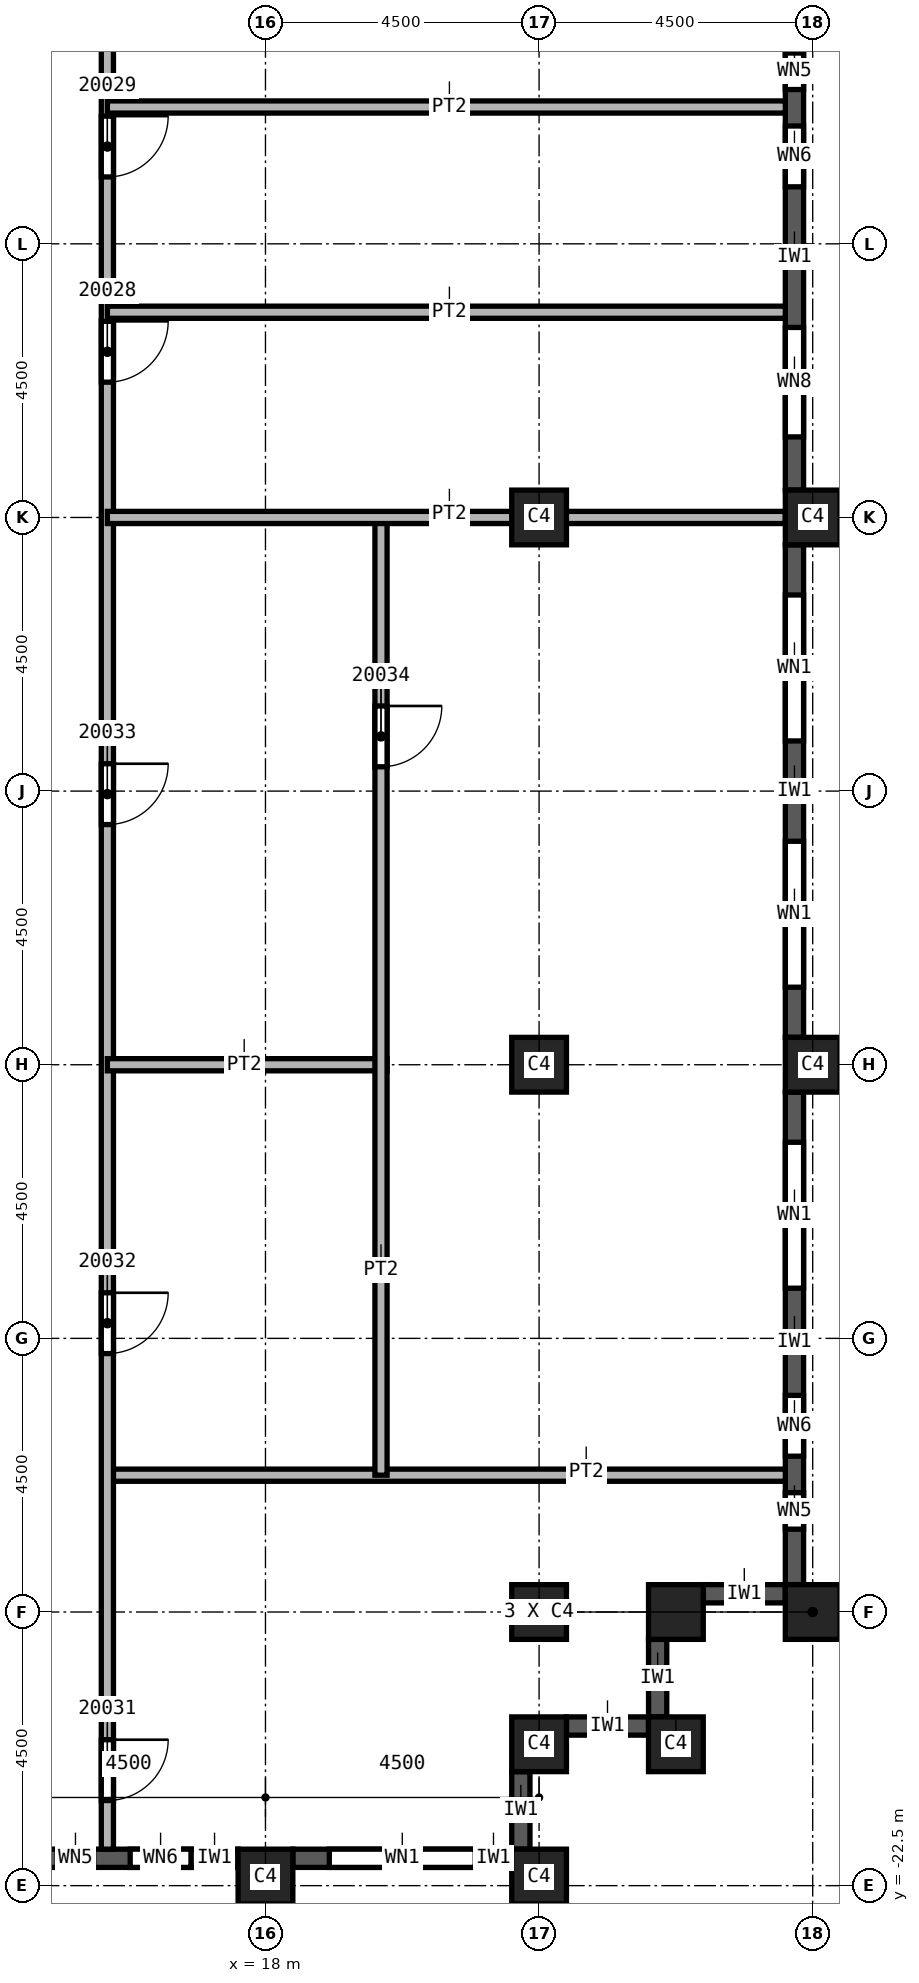
"""IFC4 building model, lengths in metres.
Left out: names, types, materials, properties, quantities, classifications, styles, units other than length and angle.
Written with IfcOpenShell. Run it as: python <this file> out.ifc"""

import sys

from ifc_helpers import new_model, si_unit, direction, frame, frame_2d, origin, origin_2d, place, context, subcontext, project, spatial, rectangle, extrude, element, fill, save


model = new_model("IFC4")
c1 = context("Model", 3, precision=1e-05, world=origin(), true_north=direction((0.0, 1.0)))
c2 = subcontext(c1, "Body", "Model", "MODEL_VIEW")
j1 = project(units=[si_unit("LENGTHUNIT", "METRE"), si_unit("PLANEANGLEUNIT", "RADIAN")], contexts=[c1])
p1 = place(None, origin())
s1 = spatial("IfcSite", under=j1, at=p1, CompositionType="ELEMENT")
p2 = place(p1, origin())
s2 = spatial("IfcBuilding", under=s1, at=p2, CompositionType="ELEMENT")
p3 = place(p2, frame((0.0, 0.0, 286.0)))
s3 = spatial("IfcBuildingStorey", under=s2, at=p3, CompositionType="ELEMENT", Elevation=286.0)
for number, where, z_axis, x_axis in (
    (1, (22.5, 0.0, 0.0), (0.0, 0.0, 1.0), (1.0, 0.0, 0.0)),
    (2, (22.5, -9.0, 0.0), (0.0, 0.0, 1.0), (1.0, 0.0, 0.0)),
    (3, (22.5, -18.0, 0.0), (0.0, 0.0, 1.0), (1.0, 0.0, 0.0)),
    (4, (27.0, 0.0, 0.0), (0.0, 0.0, 1.0), (0.0, 1.0, 0.0)),
    (5, (27.0, -9.0, 0.0), (0.0, 0.0, 1.0), (0.0, 1.0, 0.0)),
    (6, (27.0, -18.0, 0.0), (0.0, 0.0, 1.0), (0.0, 1.0, 0.0)),
    (7, (18.0, -22.35, 0.0), (0.0, 0.0, 1.0), (1.0, 0.0, 0.0)),
    (8, (22.5, -22.35, 0.0), (0.0, 0.0, 1.0), (1.0, 0.0, 0.0)),
    (9, (22.5, -20.175, 0.0), (0.0, 0.0, 1.0), (1.0, 0.0, 0.0)),
    (10, (24.75, -20.175, 0.0), (0.0, 0.0, 1.0), (1.0, 0.0, 0.0)),
    (11, (24.75, -18.0, 0.0), (0.0, 0.0, 1.0), (1.0, 0.0, 0.0)),
):
    element("IfcColumn", number, at=place(p3, frame(where, z_axis=z_axis, x_axis=x_axis)), inside=s3, PredefinedType="COLUMN", context=c2, shape_type="SweptSolid", body=[
        extrude(rectangle(XDim=0.9, YDim=0.9, at=origin_2d()), origin(), (0.0, 0.0, 1.0), 3.72),
    ])
p4 = place(p3, frame((13.95, -22.05, 0.0), z_axis=(0.0, 0.0, 1.0), x_axis=(1.0, 0.0, 0.0)))
e12 = element("IfcWall", 12, at=p4, inside=s3, PredefinedType="SOLIDWALL", context=c2, shape_type="SweptSolid", body=[
    extrude(rectangle(XDim=3.6, YDim=0.3, at=frame_2d((1.8, 0.0))), origin(), (0.0, 0.0, 1.0), 3.12),
])
p5 = place(p4, frame((0.625, 0.0, 0.8)))
e13 = element("IfcOpeningElement", 13, at=p5, cuts=e12, PredefinedType="OPENING", context=c2, shape_type="SweptSolid", body=[
    extrude(rectangle(XDim=0.6, YDim=1.95, at=frame_2d((0.3, 0.975))), frame((0.0, 0.15, 0.0), z_axis=(0.0, -1.0, 0.0), x_axis=(1.0, 0.0, 0.0)), (0.0, 0.0, 1.0), 0.3),
])
p6 = place(p4, frame((1.825, 0.0, 0.8)))
e14 = element("IfcOpeningElement", 14, at=p6, cuts=e12, PredefinedType="OPENING", context=c2, shape_type="SweptSolid", body=[
    extrude(rectangle(XDim=1.0, YDim=1.95, at=frame_2d((0.5, 0.975))), frame((0.0, 0.15, 0.0), z_axis=(0.0, -1.0, 0.0), x_axis=(1.0, 0.0, 0.0)), (0.0, 0.0, 1.0), 0.3),
])
p7 = place(p3, frame((18.45, -22.05, 0.0), z_axis=(0.0, 0.0, 1.0), x_axis=(1.0, 0.0, 0.0)))
e15 = element("IfcWall", 15, at=p7, inside=s3, PredefinedType="SOLIDWALL", context=c2, shape_type="SweptSolid", body=[
    extrude(rectangle(XDim=3.6, YDim=0.3, at=frame_2d((1.8, 0.0))), origin(), (0.0, 0.0, 1.0), 3.12),
])
p8 = place(p7, frame((0.6, 0.0, 0.8)))
e16 = element("IfcOpeningElement", 16, at=p8, cuts=e15, PredefinedType="OPENING", context=c2, shape_type="SweptSolid", body=[
    extrude(rectangle(XDim=2.4, YDim=1.95, at=frame_2d((1.2, 0.975))), frame((0.0, 0.15, 0.0), z_axis=(0.0, -1.0, 0.0), x_axis=(1.0, 0.0, 0.0)), (0.0, 0.0, 1.0), 0.3),
])
p9 = place(p3, frame((22.2, -21.9, 0.0), z_axis=(0.0, 0.0, 1.0), x_axis=(0.0, 1.0, 0.0)))
e17 = element("IfcWall", 17, at=p9, inside=s3, PredefinedType="SOLIDWALL", context=c2, shape_type="SweptSolid", body=[
    extrude(rectangle(XDim=1.275, YDim=0.3, at=frame_2d((0.637, 0.0))), origin(), (0.0, 0.0, 1.0), 3.12),
])
p10 = place(p3, frame((22.95, -19.875, 0.0), z_axis=(0.0, 0.0, 1.0), x_axis=(1.0, 0.0, 0.0)))
e18 = element("IfcWall", 18, at=p10, inside=s3, PredefinedType="SOLIDWALL", context=c2, shape_type="SweptSolid", body=[
    extrude(rectangle(XDim=1.35, YDim=0.3, at=frame_2d((0.675, 0.0))), origin(), (0.0, 0.0, 1.0), 3.12),
])
p11 = place(p3, frame((24.45, -19.725, 0.0), z_axis=(0.0, 0.0, 1.0), x_axis=(0.0, 1.0, 0.0)))
e19 = element("IfcWall", 19, at=p11, inside=s3, PredefinedType="SOLIDWALL", context=c2, shape_type="SweptSolid", body=[
    extrude(rectangle(XDim=1.275, YDim=0.3, at=frame_2d((0.638, 0.0))), origin(), (0.0, 0.0, 1.0), 3.12),
])
p12 = place(p3, frame((25.2, -17.7, 0.0), z_axis=(0.0, 0.0, 1.0), x_axis=(1.0, 0.0, 0.0)))
e20 = element("IfcWall", 20, at=p12, inside=s3, PredefinedType="SOLIDWALL", context=c2, shape_type="SweptSolid", body=[
    extrude(rectangle(XDim=1.35, YDim=0.3, at=frame_2d((0.675, 0.0))), origin(), (0.0, 0.0, 1.0), 3.12),
])
p13 = place(p3, frame((26.7, -17.55, 0.0), z_axis=(0.0, 0.0, 1.0), x_axis=(0.0, 1.0, 0.0)))
e21 = element("IfcWall", 21, at=p13, inside=s3, PredefinedType="SOLIDWALL", context=c2, shape_type="SweptSolid", body=[
    extrude(rectangle(XDim=8.1, YDim=0.3, at=frame_2d((4.05, 0.0))), origin(), (0.0, 0.0, 1.0), 3.12),
])
p14 = place(p13, frame((4.875, 0.0, 0.8)))
e22 = element("IfcOpeningElement", 22, at=p14, cuts=e21, PredefinedType="OPENING", context=c2, shape_type="SweptSolid", body=[
    extrude(rectangle(XDim=2.4, YDim=1.95, at=frame_2d((1.2, 0.975))), frame((0.0, 0.15, 0.0), z_axis=(0.0, -1.0, 0.0), x_axis=(1.0, 0.0, 0.0)), (0.0, 0.0, 1.0), 0.3),
])
p15 = place(p13, frame((0.913, 0.0, 0.8)))
e23 = element("IfcOpeningElement", 23, at=p15, cuts=e21, PredefinedType="OPENING", context=c2, shape_type="SweptSolid", body=[
    extrude(rectangle(XDim=0.6, YDim=1.95, at=frame_2d((0.3, 0.975))), frame((0.0, 0.15, 0.0), z_axis=(0.0, -1.0, 0.0), x_axis=(1.0, 0.0, 0.0)), (0.0, 0.0, 1.0), 0.3),
])
p16 = place(p13, frame((2.113, 0.0, 0.8)))
e24 = element("IfcOpeningElement", 24, at=p16, cuts=e21, PredefinedType="OPENING", context=c2, shape_type="SweptSolid", body=[
    extrude(rectangle(XDim=1.0, YDim=1.95, at=frame_2d((0.5, 0.975))), frame((0.0, 0.15, 0.0), z_axis=(0.0, -1.0, 0.0), x_axis=(1.0, 0.0, 0.0)), (0.0, 0.0, 1.0), 0.3),
])
p17 = place(p3, frame((26.7, -8.55, 0.0), z_axis=(0.0, 0.0, 1.0), x_axis=(0.0, 1.0, 0.0)))
e25 = element("IfcWall", 25, at=p17, inside=s3, PredefinedType="SOLIDWALL", context=c2, shape_type="SweptSolid", body=[
    extrude(rectangle(XDim=8.1, YDim=0.3, at=frame_2d((4.05, 0.0))), origin(), (0.0, 0.0, 1.0), 3.12),
])
p18 = place(p17, frame((0.825, 0.0, 0.8)))
e26 = element("IfcOpeningElement", 26, at=p18, cuts=e25, PredefinedType="OPENING", context=c2, shape_type="SweptSolid", body=[
    extrude(rectangle(XDim=2.4, YDim=1.95, at=frame_2d((1.2, 0.975))), frame((0.0, 0.15, 0.0), z_axis=(0.0, -1.0, 0.0), x_axis=(1.0, 0.0, 0.0)), (0.0, 0.0, 1.0), 0.3),
])
p19 = place(p17, frame((4.875, 0.0, 0.8)))
e27 = element("IfcOpeningElement", 27, at=p19, cuts=e25, PredefinedType="OPENING", context=c2, shape_type="SweptSolid", body=[
    extrude(rectangle(XDim=2.4, YDim=1.95, at=frame_2d((1.2, 0.975))), frame((0.0, 0.15, 0.0), z_axis=(0.0, -1.0, 0.0), x_axis=(1.0, 0.0, 0.0)), (0.0, 0.0, 1.0), 0.3),
])
p20 = place(p3, frame((26.7, 0.45, 0.0), z_axis=(0.0, 0.0, 1.0), x_axis=(0.0, 1.0, 0.0)))
e28 = element("IfcWall", 28, at=p20, inside=s3, PredefinedType="SOLIDWALL", context=c2, shape_type="SweptSolid", body=[
    extrude(rectangle(XDim=8.1, YDim=0.3, at=frame_2d((4.05, 0.0))), origin(), (0.0, 0.0, 1.0), 3.12),
])
p21 = place(p20, frame((0.875, 0.0, 0.8)))
e29 = element("IfcOpeningElement", 29, at=p21, cuts=e28, PredefinedType="OPENING", context=c2, shape_type="SweptSolid", body=[
    extrude(rectangle(XDim=1.8, YDim=1.95, at=frame_2d((0.9, 0.975))), frame((0.0, 0.15, 0.0), z_axis=(0.0, -1.0, 0.0), x_axis=(1.0, 0.0, 0.0)), (0.0, 0.0, 1.0), 0.3),
])
p22 = place(p20, frame((4.988, 0.0, 0.8)))
e30 = element("IfcOpeningElement", 30, at=p22, cuts=e28, PredefinedType="OPENING", context=c2, shape_type="SweptSolid", body=[
    extrude(rectangle(XDim=1.0, YDim=1.95, at=frame_2d((0.5, 0.975))), frame((0.0, 0.15, 0.0), z_axis=(0.0, -1.0, 0.0), x_axis=(1.0, 0.0, 0.0)), (0.0, 0.0, 1.0), 0.3),
])
p23 = place(p20, frame((6.587, 0.0, 0.8)))
e31 = element("IfcOpeningElement", 31, at=p23, cuts=e28, PredefinedType="OPENING", context=c2, shape_type="SweptSolid", body=[
    extrude(rectangle(XDim=0.6, YDim=1.95, at=frame_2d((0.3, 0.975))), frame((0.0, 0.15, 0.0), z_axis=(0.0, -1.0, 0.0), x_axis=(1.0, 0.0, 0.0)), (0.0, 0.0, 1.0), 0.3),
])
p24 = place(p3, frame((15.4, -15.75, 0.0), z_axis=(0.0, 0.0, 1.0), x_axis=(1.0, 0.0, 0.0)))
e32 = element("IfcWall", 32, at=p24, inside=s3, PredefinedType="PARTITIONING", context=c2, shape_type="SweptSolid", body=[
    extrude(rectangle(XDim=11.15, YDim=0.2, at=frame_2d((5.575, 0.0))), origin(), (0.0, 0.0, 1.0), 3.72),
])
p25 = place(p3, frame((15.4, 21.9, 0.0), z_axis=(0.0, 0.0, 1.0), x_axis=(0.0, -1.0, 0.0)))
e33 = element("IfcWall", 33, at=p25, inside=s3, PredefinedType="PARTITIONING", context=c2, shape_type="SweptSolid", body=[
    extrude(rectangle(XDim=43.8, YDim=0.2, at=frame_2d((21.9, 0.0))), origin(), (0.0, 0.0, 1.0), 3.72),
])
p26 = place(p25, frame((18.675, 0.0, 0.0)))
e34 = element("IfcOpeningElement", 34, at=p26, cuts=e33, PredefinedType="OPENING", context=c2, shape_type="SweptSolid", body=[
    extrude(rectangle(XDim=1.0, YDim=2.1, at=frame_2d((0.5, 1.05))), frame((0.0, 0.1, 0.0), z_axis=(0.0, -1.0, 0.0), x_axis=(1.0, 0.0, 0.0)), (0.0, 0.0, 1.0), 0.2),
])
p27 = place(p25, frame((15.3, 0.0, 0.0)))
e35 = element("IfcOpeningElement", 35, at=p27, cuts=e33, PredefinedType="OPENING", context=c2, shape_type="SweptSolid", body=[
    extrude(rectangle(XDim=1.0, YDim=2.1, at=frame_2d((0.5, 1.05))), frame((0.0, 0.1, 0.0), z_axis=(0.0, -1.0, 0.0), x_axis=(1.0, 0.0, 0.0)), (0.0, 0.0, 1.0), 0.2),
])
p28 = place(p25, frame((9.85, 0.0, 0.0)))
e36 = element("IfcOpeningElement", 36, at=p28, cuts=e33, PredefinedType="OPENING", context=c2, shape_type="SweptSolid", body=[
    extrude(rectangle(XDim=1.0, YDim=2.1, at=frame_2d((0.5, 1.05))), frame((0.0, 0.1, 0.0), z_axis=(0.0, -1.0, 0.0), x_axis=(1.0, 0.0, 0.0)), (0.0, 0.0, 1.0), 0.2),
])
p29 = place(p25, frame((42.0, 0.0, 0.0)))
e37 = element("IfcOpeningElement", 37, at=p29, cuts=e33, PredefinedType="OPENING", context=c2, shape_type="SweptSolid", body=[
    extrude(rectangle(XDim=1.0, YDim=2.1, at=frame_2d((0.5, 1.05))), frame((0.0, 0.1, 0.0), z_axis=(0.0, -1.0, 0.0), x_axis=(1.0, 0.0, 0.0)), (0.0, 0.0, 1.0), 0.2),
])
p30 = place(p25, frame((34.65, 0.0, 0.0)))
e38 = element("IfcOpeningElement", 38, at=p30, cuts=e33, PredefinedType="OPENING", context=c2, shape_type="SweptSolid", body=[
    extrude(rectangle(XDim=1.0, YDim=2.1, at=frame_2d((0.5, 1.05))), frame((0.0, 0.1, 0.0), z_axis=(0.0, -1.0, 0.0), x_axis=(1.0, 0.0, 0.0)), (0.0, 0.0, 1.0), 0.2),
])
p31 = place(p25, frame((25.95, 0.0, 0.0)))
e39 = element("IfcOpeningElement", 39, at=p31, cuts=e33, PredefinedType="OPENING", context=c2, shape_type="SweptSolid", body=[
    extrude(rectangle(XDim=1.0, YDim=2.1, at=frame_2d((0.5, 1.05))), frame((0.0, 0.1, 0.0), z_axis=(0.0, -1.0, 0.0), x_axis=(1.0, 0.0, 0.0)), (0.0, 0.0, 1.0), 0.2),
])
p32 = place(p3, frame((15.4, -9.0, 0.0), z_axis=(0.0, 0.0, 1.0), x_axis=(1.0, 0.0, 0.0)))
e40 = element("IfcWall", 40, at=p32, inside=s3, PredefinedType="PARTITIONING", context=c2, shape_type="SweptSolid", body=[
    extrude(rectangle(XDim=4.6, YDim=0.2, at=frame_2d((2.3, 0.0))), origin(), (0.0, 0.0, 1.0), 3.72),
])
for number, where, z_axis, x_axis in (
    (41, (15.4, 3.375, 0.0), (0.0, 0.0, 1.0), (1.0, 0.0, 0.0)),
    (42, (15.4, 6.75, 0.0), (0.0, 0.0, 1.0), (1.0, 0.0, 0.0)),
):
    element("IfcWall", number, at=place(p3, frame(where, z_axis=z_axis, x_axis=x_axis)), inside=s3, PredefinedType="PARTITIONING", context=c2, shape_type="SweptSolid", body=[
        extrude(rectangle(XDim=11.15, YDim=0.2, at=frame_2d((5.575, 0.0))), origin(), (0.0, 0.0, 1.0), 3.72),
    ])
p33 = place(p3, frame((19.9, 0.0, 0.0), z_axis=(0.0, 0.0, 1.0), x_axis=(0.0, -1.0, 0.0)))
e43 = element("IfcWall", 43, at=p33, inside=s3, PredefinedType="PARTITIONING", context=c2, shape_type="SweptSolid", body=[
    extrude(rectangle(XDim=15.75, YDim=0.2, at=frame_2d((7.875, 0.0))), origin(), (0.0, 0.0, 1.0), 3.72),
])
p34 = place(p33, frame((3.1, 0.0, 0.0)))
e44 = element("IfcOpeningElement", 44, at=p34, cuts=e43, PredefinedType="OPENING", context=c2, shape_type="SweptSolid", body=[
    extrude(rectangle(XDim=1.0, YDim=2.1, at=frame_2d((0.5, 1.05))), frame((0.0, 0.1, 0.0), z_axis=(0.0, -1.0, 0.0), x_axis=(1.0, 0.0, 0.0)), (0.0, 0.0, 1.0), 0.2),
])
p35 = place(p3, frame((26.55, 0.0, 0.0), z_axis=(0.0, 0.0, 1.0), x_axis=(-1.0, 0.0, 0.0)))
e45 = element("IfcWall", 45, at=p35, inside=s3, PredefinedType="PARTITIONING", context=c2, shape_type="SweptSolid", body=[
    extrude(rectangle(XDim=11.15, YDim=0.2, at=frame_2d((5.575, 0.0))), origin(), (0.0, 0.0, 1.0), 3.72),
])
p36 = place(p8, origin())
e46 = element("IfcWindow", 46, at=p36, inside=s3, PartitioningType="SINGLE_PANEL", PredefinedType="WINDOW", context=c2, shape_type="SweptSolid", body=[
    extrude(rectangle(XDim=2.4, YDim=1.95, at=frame_2d((1.2, 0.975))), frame((0.0, 0.03, 0.0), z_axis=(0.0, -1.0, 0.0), x_axis=(1.0, 0.0, 0.0)), (0.0, 0.0, 1.0), 0.06),
])
fill(e16, e46)
p37 = place(p14, origin())
e47 = element("IfcWindow", 47, at=p37, inside=s3, PartitioningType="SINGLE_PANEL", PredefinedType="WINDOW", context=c2, shape_type="SweptSolid", body=[
    extrude(rectangle(XDim=2.4, YDim=1.95, at=frame_2d((1.2, 0.975))), frame((0.0, 0.03, 0.0), z_axis=(0.0, -1.0, 0.0), x_axis=(1.0, 0.0, 0.0)), (0.0, 0.0, 1.0), 0.06),
])
fill(e22, e47)
p38 = place(p18, origin())
e48 = element("IfcWindow", 48, at=p38, inside=s3, PartitioningType="SINGLE_PANEL", PredefinedType="WINDOW", context=c2, shape_type="SweptSolid", body=[
    extrude(rectangle(XDim=2.4, YDim=1.95, at=frame_2d((1.2, 0.975))), frame((0.0, 0.03, 0.0), z_axis=(0.0, -1.0, 0.0), x_axis=(1.0, 0.0, 0.0)), (0.0, 0.0, 1.0), 0.06),
])
fill(e26, e48)
p39 = place(p19, origin())
e49 = element("IfcWindow", 49, at=p39, inside=s3, PartitioningType="SINGLE_PANEL", PredefinedType="WINDOW", context=c2, shape_type="SweptSolid", body=[
    extrude(rectangle(XDim=2.4, YDim=1.95, at=frame_2d((1.2, 0.975))), frame((0.0, 0.03, 0.0), z_axis=(0.0, -1.0, 0.0), x_axis=(1.0, 0.0, 0.0)), (0.0, 0.0, 1.0), 0.06),
])
fill(e27, e49)
p40 = place(p26, origin())
e50 = element("IfcDoor", 50, at=p40, inside=s3, OperationType="SINGLE_SWING_LEFT", PredefinedType="DOOR", context=c2, shape_type="SweptSolid", body=[
    extrude(rectangle(XDim=1.0, YDim=2.1, at=frame_2d((0.5, 1.05))), frame((0.0, 0.025, 0.0), z_axis=(0.0, -1.0, 0.0), x_axis=(1.0, 0.0, 0.0)), (0.0, 0.0, 1.0), 0.05),
])
fill(e34, e50)
p41 = place(p27, origin())
e51 = element("IfcDoor", 51, at=p41, inside=s3, OperationType="SINGLE_SWING_RIGHT", PredefinedType="DOOR", context=c2, shape_type="SweptSolid", body=[
    extrude(rectangle(XDim=1.0, YDim=2.1, at=frame_2d((0.5, 1.05))), frame((0.0, 0.025, 0.0), z_axis=(0.0, -1.0, 0.0), x_axis=(1.0, 0.0, 0.0)), (0.0, 0.0, 1.0), 0.05),
])
fill(e35, e51)
p42 = place(p29, origin())
e52 = element("IfcDoor", 52, at=p42, inside=s3, OperationType="SINGLE_SWING_RIGHT", PredefinedType="DOOR", context=c2, shape_type="SweptSolid", body=[
    extrude(rectangle(XDim=1.0, YDim=2.1, at=frame_2d((0.5, 1.05))), frame((0.0, 0.025, 0.0), z_axis=(0.0, -1.0, 0.0), x_axis=(1.0, 0.0, 0.0)), (0.0, 0.0, 1.0), 0.05),
])
fill(e37, e52)
p43 = place(p30, origin())
e53 = element("IfcDoor", 53, at=p43, inside=s3, OperationType="SINGLE_SWING_LEFT", PredefinedType="DOOR", context=c2, shape_type="SweptSolid", body=[
    extrude(rectangle(XDim=1.0, YDim=2.1, at=frame_2d((0.5, 1.05))), frame((0.0, 0.025, 0.0), z_axis=(0.0, -1.0, 0.0), x_axis=(1.0, 0.0, 0.0)), (0.0, 0.0, 1.0), 0.05),
])
fill(e38, e53)
p44 = place(p31, origin())
e54 = element("IfcDoor", 54, at=p44, inside=s3, OperationType="SINGLE_SWING_RIGHT", PredefinedType="DOOR", context=c2, shape_type="SweptSolid", body=[
    extrude(rectangle(XDim=1.0, YDim=2.1, at=frame_2d((0.5, 1.05))), frame((0.0, 0.025, 0.0), z_axis=(0.0, -1.0, 0.0), x_axis=(1.0, 0.0, 0.0)), (0.0, 0.0, 1.0), 0.05),
])
fill(e39, e54)
p45 = place(p34, origin())
e55 = element("IfcDoor", 55, at=p45, inside=s3, OperationType="SINGLE_SWING_LEFT", PredefinedType="DOOR", context=c2, shape_type="SweptSolid", body=[
    extrude(rectangle(XDim=1.0, YDim=2.1, at=frame_2d((0.5, 1.05))), frame((0.0, 0.025, 0.0), z_axis=(0.0, -1.0, 0.0), x_axis=(1.0, 0.0, 0.0)), (0.0, 0.0, 1.0), 0.05),
])
fill(e44, e55)
p46 = place(p5, origin())
e56 = element("IfcWindow", 56, at=p46, inside=s3, PartitioningType="SINGLE_PANEL", PredefinedType="WINDOW", context=c2, shape_type="SweptSolid", body=[
    extrude(rectangle(XDim=0.6, YDim=1.95, at=frame_2d((0.3, 0.975))), frame((0.0, 0.03, 0.0), z_axis=(0.0, -1.0, 0.0), x_axis=(1.0, 0.0, 0.0)), (0.0, 0.0, 1.0), 0.06),
])
fill(e13, e56)
p47 = place(p6, origin())
e57 = element("IfcWindow", 57, at=p47, inside=s3, PartitioningType="SINGLE_PANEL", PredefinedType="WINDOW", context=c2, shape_type="SweptSolid", body=[
    extrude(rectangle(XDim=1.0, YDim=1.95, at=frame_2d((0.5, 0.975))), frame((0.0, 0.03, 0.0), z_axis=(0.0, -1.0, 0.0), x_axis=(1.0, 0.0, 0.0)), (0.0, 0.0, 1.0), 0.06),
])
fill(e14, e57)
p48 = place(p15, origin())
e58 = element("IfcWindow", 58, at=p48, inside=s3, PartitioningType="SINGLE_PANEL", PredefinedType="WINDOW", context=c2, shape_type="SweptSolid", body=[
    extrude(rectangle(XDim=0.6, YDim=1.95, at=frame_2d((0.3, 0.975))), frame((0.0, 0.03, 0.0), z_axis=(0.0, -1.0, 0.0), x_axis=(1.0, 0.0, 0.0)), (0.0, 0.0, 1.0), 0.06),
])
fill(e23, e58)
p49 = place(p16, origin())
e59 = element("IfcWindow", 59, at=p49, inside=s3, PartitioningType="SINGLE_PANEL", PredefinedType="WINDOW", context=c2, shape_type="SweptSolid", body=[
    extrude(rectangle(XDim=1.0, YDim=1.95, at=frame_2d((0.5, 0.975))), frame((0.0, 0.03, 0.0), z_axis=(0.0, -1.0, 0.0), x_axis=(1.0, 0.0, 0.0)), (0.0, 0.0, 1.0), 0.06),
])
fill(e24, e59)
p50 = place(p21, origin())
e60 = element("IfcWindow", 60, at=p50, inside=s3, PartitioningType="SINGLE_PANEL", PredefinedType="WINDOW", context=c2, shape_type="SweptSolid", body=[
    extrude(rectangle(XDim=1.8, YDim=1.95, at=frame_2d((0.9, 0.975))), frame((0.0, 0.03, 0.0), z_axis=(0.0, -1.0, 0.0), x_axis=(1.0, 0.0, 0.0)), (0.0, 0.0, 1.0), 0.06),
])
fill(e29, e60)
p51 = place(p22, origin())
e61 = element("IfcWindow", 61, at=p51, inside=s3, PartitioningType="SINGLE_PANEL", PredefinedType="WINDOW", context=c2, shape_type="SweptSolid", body=[
    extrude(rectangle(XDim=1.0, YDim=1.95, at=frame_2d((0.5, 0.975))), frame((0.0, 0.03, 0.0), z_axis=(0.0, -1.0, 0.0), x_axis=(1.0, 0.0, 0.0)), (0.0, 0.0, 1.0), 0.06),
])
fill(e30, e61)
p52 = place(p23, origin())
e62 = element("IfcWindow", 62, at=p52, inside=s3, PartitioningType="SINGLE_PANEL", PredefinedType="WINDOW", context=c2, shape_type="SweptSolid", body=[
    extrude(rectangle(XDim=0.6, YDim=1.95, at=frame_2d((0.3, 0.975))), frame((0.0, 0.03, 0.0), z_axis=(0.0, -1.0, 0.0), x_axis=(1.0, 0.0, 0.0)), (0.0, 0.0, 1.0), 0.06),
])
fill(e31, e62)
save(model, sys.argv[1])
